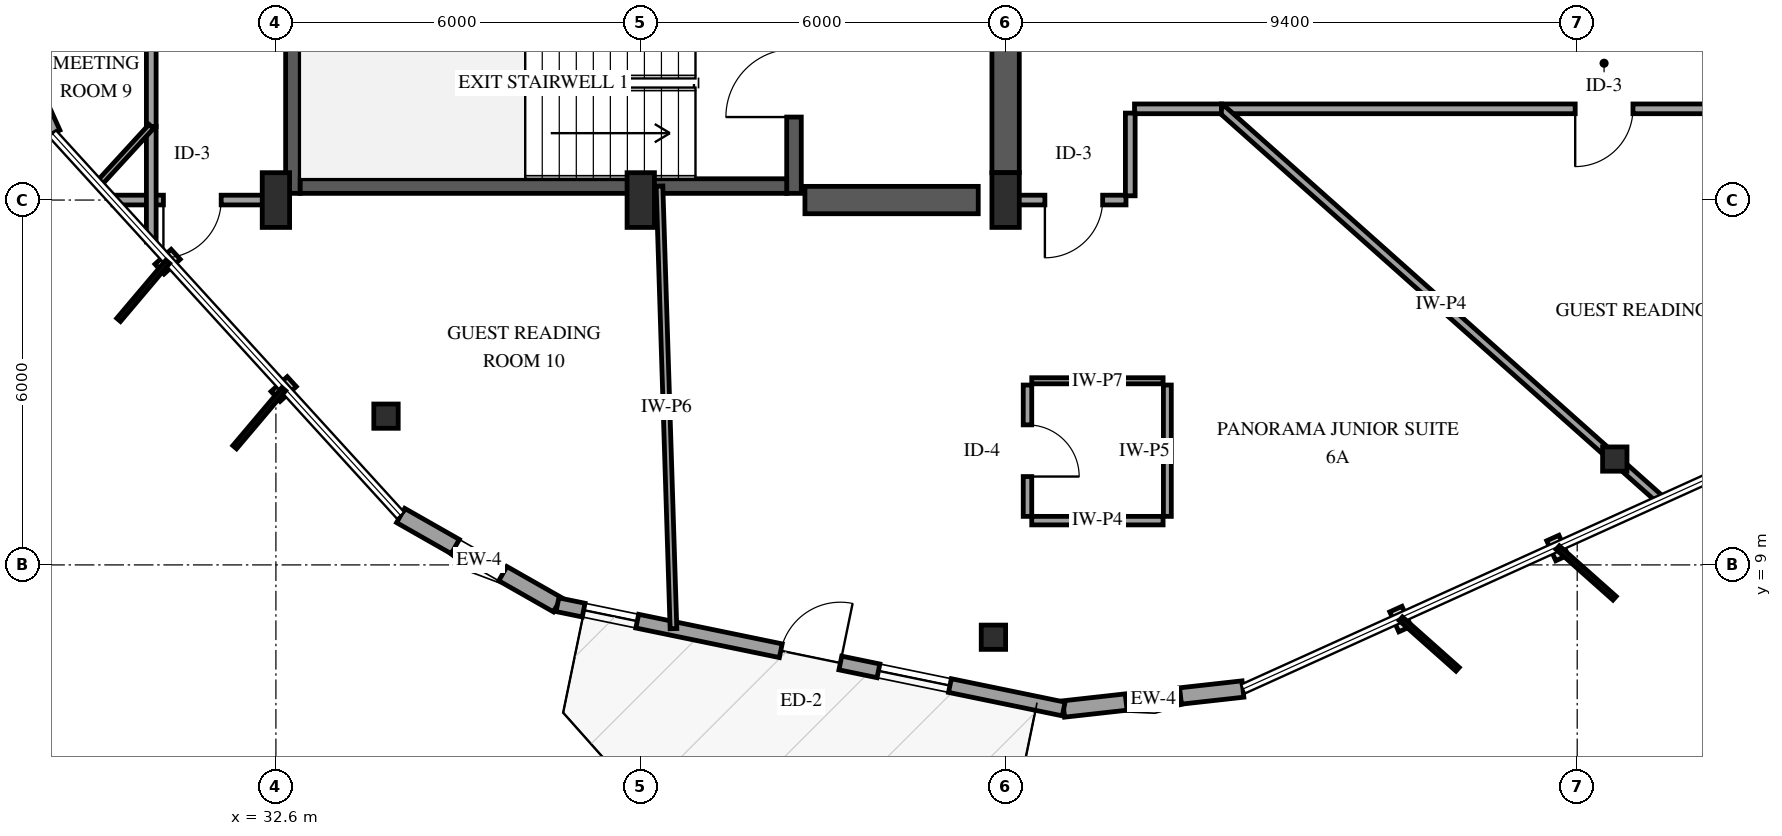
"""IFC4 building model, lengths in metres.
Left out: names, types, materials, properties, quantities, classifications, styles, units other than length and angle.
Written with IfcOpenShell. Run it as: python <this file> out.ifc"""

import sys

from ifc_helpers import new_model, si_unit, direction, frame, frame_2d, origin, origin_2d, place, context, subcontext, project, spatial, rectangle, i_section, extrude, element, fill, save


model = new_model("IFC4")
c1 = context("Model", 3, precision=1e-05, world=origin(), true_north=direction((0.0, 1.0)))
c2 = subcontext(c1, "Body", "Model", "MODEL_VIEW")
j1 = project(units=[si_unit("LENGTHUNIT", "METRE"), si_unit("PLANEANGLEUNIT", "RADIAN")], contexts=[c1])
p1 = place(None, origin())
s1 = spatial("IfcSite", under=j1, at=p1, CompositionType="ELEMENT")
p2 = place(p1, origin())
s2 = spatial("IfcBuilding", under=s1, at=p2, CompositionType="ELEMENT")
p3 = place(p2, frame((0.0, 0.0, 257.5)))
s3 = spatial("IfcBuildingStorey", under=s2, at=p3, CompositionType="ELEMENT", Elevation=257.5)
p4 = place(p3, frame((32.88, 15.11, 0.0), z_axis=(0.0, 0.0, 1.0), x_axis=(0.0, 1.0, 0.0)))
e1 = element("IfcWall", 1, at=p4, inside=s3, PredefinedType="SHEAR", context=c2, shape_type="SweptSolid", body=[
    extrude(rectangle(XDim=3.63, YDim=0.24, at=frame_2d((1.815, 0.0))), origin(), (0.0, 0.0, 1.0), 3.75),
])
p5 = place(p3, frame((41.12, 15.11, 0.0), z_axis=(0.0, 0.0, 1.0), x_axis=(0.0, 1.0, 0.0)))
e2 = element("IfcWall", 2, at=p5, inside=s3, PredefinedType="SHEAR", context=c2, shape_type="SweptSolid", body=[
    extrude(rectangle(XDim=3.63, YDim=0.24, at=frame_2d((1.815, 0.0))), origin(), (0.0, 0.0, 1.0), 3.75),
])
p6 = place(p5, frame((1.255, 0.0, 0.0)))
e3 = element("IfcOpeningElement", 3, at=p6, cuts=e2, PredefinedType="OPENING", context=c2, shape_type="SweptSolid", body=[
    extrude(rectangle(XDim=1.12, YDim=2.15, at=frame_2d((0.56, 1.075))), frame((0.0, 0.13, 0.0), z_axis=(0.0, -1.0, 0.0), x_axis=(1.0, 0.0, 0.0)), (0.0, 0.0, 1.0), 0.26),
])
p7 = place(p3, frame((33.0, 15.23, 0.0), z_axis=(0.0, 0.0, 1.0), x_axis=(1.0, 0.0, 0.0)))
e4 = element("IfcWall", 4, at=p7, inside=s3, PredefinedType="SHEAR", context=c2, shape_type="SweptSolid", body=[
    extrude(rectangle(XDim=8.0, YDim=0.24, at=frame_2d((4.0, 0.0))), origin(), (0.0, 0.0, 1.0), 3.75),
])
p8 = place(p3, frame((41.3, 15.0, 0.0), z_axis=(0.0, 0.0, 1.0), x_axis=(1.0, 0.0, 0.0)))
e5 = element("IfcWall", 5, at=p8, inside=s3, PredefinedType="SHEAR", context=c2, shape_type="SweptSolid", body=[
    extrude(rectangle(XDim=2.85, YDim=0.45, at=frame_2d((1.425, 0.0))), origin(), (0.0, 0.0, 1.0), 3.75),
])
p9 = place(p3, frame((44.6, 15.45, 0.0), z_axis=(0.0, 0.0, 1.0), x_axis=(0.0, 1.0, 0.0)))
e6 = element("IfcWall", 6, at=p9, inside=s3, PredefinedType="SHEAR", context=c2, shape_type="SweptSolid", body=[
    extrude(rectangle(XDim=6.35, YDim=0.45, at=frame_2d((3.175, 0.0))), origin(), (0.0, 0.0, 1.0), 3.75),
])
for number, where, z_axis, x_axis in (
    (7, (32.6, 15.0, 0.0), (0.0, 0.0, 1.0), (1.0, 0.0, 0.0)),
    (8, (38.6, 15.0, 0.0), (0.0, 0.0, 1.0), (1.0, 0.0, 0.0)),
    (9, (44.6, 15.0, 0.0), (0.0, 0.0, 1.0), (1.0, 0.0, 0.0)),
):
    element("IfcColumn", number, at=place(p3, frame(where, z_axis=z_axis, x_axis=x_axis)), inside=s3, PredefinedType="PILASTER", context=c2, shape_type="SweptSolid", body=[
        extrude(rectangle(XDim=0.45, YDim=0.9, at=origin_2d()), origin(), (0.0, 0.0, 1.0), 3.75),
    ])
for number, where, z_axis, x_axis in (
    (10, (34.411, 11.446, 0.0), (0.0, 0.0, 1.0), (1.0, 0.0, 0.0)),
    (11, (44.4, 7.811, 0.0), (0.0, 0.0, 1.0), (1.0, 0.0, 0.0)),
    (12, (54.618, 10.74, 0.0), (0.0, 0.0, 1.0), (1.0, 0.0, 0.0)),
):
    element("IfcColumn", number, at=place(p3, frame(where, z_axis=z_axis, x_axis=x_axis)), inside=s3, PredefinedType="COLUMN", context=c2, shape_type="SweptSolid", body=[
        extrude(i_section(OverallWidth=0.401, OverallDepth=0.399, WebThickness=0.025, FlangeThickness=0.04, FilletRadius=0.038, at=origin_2d()), origin(), (0.0, 0.0, 1.0), 3.75),
    ])
p10 = place(p3, frame((27.701, 18.796, 0.0), z_axis=(0.0, 0.0, 1.0), x_axis=(0.412481781571, -0.910965850003, 0.0)))
e13 = element("IfcWall", 13, at=p10, inside=s3, PredefinedType="SOLIDWALL", context=c2, shape_type="SweptSolid", body=[
    extrude(rectangle(XDim=2.967, YDim=0.27, at=frame_2d((1.483, 0.0))), origin(), (0.0, 0.0, 1.0), 2.829),
])
p11 = place(p10, frame((1.033, 0.0, 0.75)))
e14 = element("IfcOpeningElement", 14, at=p11, cuts=e13, PredefinedType="OPENING", context=c2, shape_type="SweptSolid", body=[
    extrude(rectangle(XDim=0.9, YDim=1.5, at=frame_2d((0.45, 0.75))), frame((0.0, 0.145, 0.0), z_axis=(0.0, -1.0, 0.0), x_axis=(1.0, 0.0, 0.0)), (0.0, 0.0, 1.0), 0.29),
])
p12 = place(p3, frame((34.652, 9.812, 0.0), z_axis=(0.0, 0.0, 1.0), x_axis=(0.869122967752, -0.494596064406, 0.0)))
e15 = element("IfcWall", 15, at=p12, inside=s3, PredefinedType="SOLIDWALL", context=c2, shape_type="SweptSolid", body=[
    extrude(rectangle(XDim=2.967, YDim=0.27, at=frame_2d((1.483, 0.0))), origin(), (0.0, 0.0, 1.0), 2.829),
])
p13 = place(p12, frame((1.033, 0.0, 0.75)))
e16 = element("IfcOpeningElement", 16, at=p13, cuts=e15, PredefinedType="OPENING", context=c2, shape_type="SweptSolid", body=[
    extrude(rectangle(XDim=0.9, YDim=1.5, at=frame_2d((0.45, 0.75))), frame((0.0, 0.145, 0.0), z_axis=(0.0, -1.0, 0.0), x_axis=(1.0, 0.0, 0.0)), (0.0, 0.0, 1.0), 0.29),
])
p14 = place(p3, frame((45.555, 6.63, 0.0), z_axis=(0.0, 0.0, 1.0), x_axis=(0.993846546507, 0.110765707676, 0.0)))
e17 = element("IfcWall", 17, at=p14, inside=s3, PredefinedType="SOLIDWALL", context=c2, shape_type="SweptSolid", body=[
    extrude(rectangle(XDim=2.967, YDim=0.27, at=frame_2d((1.483, 0.0))), origin(), (0.0, 0.0, 1.0), 2.829),
])
p15 = place(p14, frame((1.033, 0.0, 0.75)))
e18 = element("IfcOpeningElement", 18, at=p15, cuts=e17, PredefinedType="OPENING", context=c2, shape_type="SweptSolid", body=[
    extrude(rectangle(XDim=0.9, YDim=1.5, at=frame_2d((0.45, 0.75))), frame((0.0, 0.145, 0.0), z_axis=(0.0, -1.0, 0.0), x_axis=(1.0, 0.0, 0.0)), (0.0, 0.0, 1.0), 0.29),
])
p16 = place(p3, frame((37.23, 8.345, 0.0), z_axis=(0.0, 0.0, 1.0), x_axis=(0.979436514716, -0.201752605043, 0.0)))
e19 = element("IfcWall", 19, at=p16, inside=s3, PredefinedType="SOLIDWALL", context=c2, shape_type="SweptSolid", body=[
    extrude(rectangle(XDim=8.5, YDim=0.23, at=frame_2d((4.25, 0.0))), origin(), (0.0, 0.0, 1.0), 2.829),
])
p17 = place(p16, frame((3.75, 0.0, 0.0)))
e20 = element("IfcOpeningElement", 20, at=p17, cuts=e19, PredefinedType="OPENING", context=c2, shape_type="SweptSolid", body=[
    extrude(rectangle(XDim=1.0, YDim=2.15, at=frame_2d((0.5, 1.075))), frame((0.0, 0.125, 0.0), z_axis=(0.0, -1.0, 0.0), x_axis=(1.0, 0.0, 0.0)), (0.0, 0.0, 1.0), 0.25),
])
p18 = place(p16, frame((0.44, 0.0, 0.72)))
e21 = element("IfcOpeningElement", 21, at=p18, cuts=e19, PredefinedType="OPENING", context=c2, shape_type="SweptSolid", body=[
    extrude(rectangle(XDim=0.9, YDim=1.5, at=frame_2d((0.45, 0.75))), frame((0.0, 0.125, 0.0), z_axis=(0.0, -1.0, 0.0), x_axis=(1.0, 0.0, 0.0)), (0.0, 0.0, 1.0), 0.25),
])
p19 = place(p16, frame((5.39, 0.0, 0.72)))
e22 = element("IfcOpeningElement", 22, at=p19, cuts=e19, PredefinedType="OPENING", context=c2, shape_type="SweptSolid", body=[
    extrude(rectangle(XDim=1.2, YDim=1.6, at=frame_2d((0.6, 0.8))), frame((0.0, 0.125, 0.0), z_axis=(0.0, -1.0, 0.0), x_axis=(1.0, 0.0, 0.0)), (0.0, 0.0, 1.0), 0.25),
])
p20 = place(p3, frame((60.735, 16.5, 0.0), z_axis=(0.0, 0.0, 1.0), x_axis=(-1.0, 0.0, 0.0)))
e23 = element("IfcWall", 23, at=p20, inside=s3, PredefinedType="PARTITIONING", context=c2, shape_type="SweptSolid", body=[
    extrude(rectangle(XDim=12.586, YDim=0.16, at=frame_2d((6.293, 0.0))), origin(), (0.0, 0.0, 1.0), 3.45),
])
p21 = place(p20, frame((5.818, 0.0, 0.0)))
e24 = element("IfcOpeningElement", 24, at=p21, cuts=e23, PredefinedType="OPENING", context=c2, shape_type="SweptSolid", body=[
    extrude(rectangle(XDim=0.95, YDim=2.15, at=frame_2d((0.475, 1.075))), frame((0.0, 0.09, 0.0), z_axis=(0.0, -1.0, 0.0), x_axis=(1.0, 0.0, 0.0)), (0.0, 0.0, 1.0), 0.18),
])
p22 = place(p3, frame((48.149, 16.5, 0.0), z_axis=(0.0, 0.0, 1.0), x_axis=(0.746878427267, -0.664960611527, 0.0)))
e25 = element("IfcWall", 25, at=p22, inside=s3, PredefinedType="PARTITIONING", context=c2, shape_type="SweptSolid", body=[
    extrude(rectangle(XDim=9.671, YDim=0.14, at=frame_2d((4.835, 0.0))), origin(), (0.0, 0.0, 1.0), 2.828),
])
p23 = place(p3, frame((38.908, 15.23, 0.0), z_axis=(0.0, 0.0, 1.0), x_axis=(0.03158331011, -0.999501122822, 0.0)))
e26 = element("IfcWall", 26, at=p23, inside=s3, PredefinedType="PARTITIONING", context=c2, shape_type="SweptSolid", body=[
    extrude(rectangle(XDim=7.282, YDim=0.11, at=frame_2d((3.641, 0.0))), origin(), (0.0, 0.0, 1.0), 3.45),
])
p24 = place(p3, frame((30.55, 16.21, 0.0), z_axis=(0.0, 0.0, 1.0), x_axis=(0.0, 1.0, 0.0)))
e27 = element("IfcWall", 27, at=p24, inside=s3, PredefinedType="PARTITIONING", context=c2, shape_type="SweptSolid", body=[
    extrude(rectangle(XDim=5.024, YDim=0.16, at=frame_2d((2.512, 0.0))), origin(), (0.0, 0.0, 1.0), 3.45),
])
p25 = place(p24, frame((2.037, 0.0, 0.0)))
e28 = element("IfcOpeningElement", 28, at=p25, cuts=e27, PredefinedType="OPENING", context=c2, shape_type="SweptSolid", body=[
    extrude(rectangle(XDim=0.95, YDim=2.15, at=frame_2d((0.475, 1.075))), frame((0.0, 0.09, 0.0), z_axis=(0.0, -1.0, 0.0), x_axis=(1.0, 0.0, 0.0)), (0.0, 0.0, 1.0), 0.18),
])
p26 = place(p3, frame((32.53, 15.0, 0.0), z_axis=(0.0, 0.0, 1.0), x_axis=(-1.0, 0.0, 0.0)))
e29 = element("IfcWall", 29, at=p26, inside=s3, PredefinedType="PARTITIONING", context=c2, shape_type="SweptSolid", body=[
    extrude(rectangle(XDim=2.609, YDim=0.16, at=frame_2d((1.305, 0.0))), origin(), (0.0, 0.0, 1.0), 3.45),
])
p27 = place(p26, frame((0.83, 0.0, 0.0)))
e30 = element("IfcOpeningElement", 30, at=p27, cuts=e29, PredefinedType="OPENING", context=c2, shape_type="SweptSolid", body=[
    extrude(rectangle(XDim=0.95, YDim=2.15, at=frame_2d((0.475, 1.075))), frame((0.0, 0.09, 0.0), z_axis=(0.0, -1.0, 0.0), x_axis=(1.0, 0.0, 0.0)), (0.0, 0.0, 1.0), 0.18),
])
p28 = place(p3, frame((44.96, 11.958, 0.0), z_axis=(0.0, 0.0, 1.0), x_axis=(0.0, -1.0, 0.0)))
e31 = element("IfcWall", 31, at=p28, inside=s3, PredefinedType="PARTITIONING", context=c2, shape_type="SweptSolid", body=[
    extrude(rectangle(XDim=2.16, YDim=0.14, at=frame_2d((1.08, 0.0))), origin(), (0.0, 0.0, 1.0), 2.828),
])
p29 = place(p28, frame((0.655, 0.0, 0.0)))
e32 = element("IfcOpeningElement", 32, at=p29, cuts=e31, PredefinedType="OPENING", context=c2, shape_type="SweptSolid", body=[
    extrude(rectangle(XDim=0.85, YDim=2.1, at=frame_2d((0.425, 1.05))), frame((0.0, 0.08, 0.0), z_axis=(0.0, -1.0, 0.0), x_axis=(1.0, 0.0, 0.0)), (0.0, 0.0, 1.0), 0.16),
])
p30 = place(p3, frame((47.26, 9.798, 0.0), z_axis=(0.0, 0.0, 1.0), x_axis=(0.0, 1.0, 0.0)))
e33 = element("IfcWall", 33, at=p30, inside=s3, PredefinedType="PARTITIONING", context=c2, shape_type="SweptSolid", body=[
    extrude(rectangle(XDim=2.16, YDim=0.13, at=frame_2d((1.08, 0.0))), origin(), (0.0, 0.0, 1.0), 3.45),
])
p31 = place(p3, frame((47.19, 12.028, 0.0), z_axis=(0.0, 0.0, 1.0), x_axis=(-1.0, 0.0, 0.0)))
e34 = element("IfcWall", 34, at=p31, inside=s3, PredefinedType="PARTITIONING", context=c2, shape_type="SweptSolid", body=[
    extrude(rectangle(XDim=2.16, YDim=0.1, at=frame_2d((1.08, 0.0))), origin(), (0.0, 0.0, 1.0), 3.45),
])
p32 = place(p3, frame((45.03, 9.728, 0.0), z_axis=(0.0, 0.0, 1.0), x_axis=(1.0, 0.0, 0.0)))
e35 = element("IfcWall", 35, at=p32, inside=s3, PredefinedType="PARTITIONING", context=c2, shape_type="SweptSolid", body=[
    extrude(rectangle(XDim=2.16, YDim=0.14, at=frame_2d((1.08, 0.0))), origin(), (0.0, 0.0, 1.0), 3.45),
])
p33 = place(p3, frame((46.58, 15.0, 0.0), z_axis=(0.0, 0.0, 1.0), x_axis=(-1.0, 0.0, 0.0)))
e36 = element("IfcWall", 36, at=p33, inside=s3, PredefinedType="PARTITIONING", context=c2, shape_type="SweptSolid", body=[
    extrude(rectangle(XDim=1.91, YDim=0.16, at=frame_2d((0.955, 0.0))), origin(), (0.0, 0.0, 1.0), 3.45),
])
p34 = place(p33, frame((0.384, 0.0, 0.0)))
e37 = element("IfcOpeningElement", 37, at=p34, cuts=e36, PredefinedType="OPENING", context=c2, shape_type="SweptSolid", body=[
    extrude(rectangle(XDim=0.95, YDim=2.15, at=frame_2d((0.475, 1.075))), frame((0.0, 0.09, 0.0), z_axis=(0.0, -1.0, 0.0), x_axis=(1.0, 0.0, 0.0)), (0.0, 0.0, 1.0), 0.18),
])
p35 = place(p3, frame((30.55, 14.311, 0.0), z_axis=(0.0, 0.0, 1.0), x_axis=(0.0, 1.0, 0.0)))
e38 = element("IfcWall", 38, at=p35, inside=s3, PredefinedType="PARTITIONING", context=c2, shape_type="SweptSolid", body=[
    extrude(rectangle(XDim=1.899, YDim=0.16, at=frame_2d((0.949, 0.0))), origin(), (0.0, 0.0, 1.0), 3.45),
])
p36 = place(p3, frame((48.149, 16.5, 0.0), z_axis=(0.0, 0.0, 1.0), x_axis=(-1.0, 0.0, 0.0)))
e39 = element("IfcWall", 39, at=p36, inside=s3, PredefinedType="PARTITIONING", context=c2, shape_type="SweptSolid", body=[
    extrude(rectangle(XDim=1.429, YDim=0.16, at=frame_2d((0.714, 0.0))), origin(), (0.0, 0.0, 1.0), 3.45),
])
p37 = place(p3, frame((46.65, 16.43, 0.0), z_axis=(0.0, 0.0, 1.0), x_axis=(0.0, -1.0, 0.0)))
e40 = element("IfcWall", 40, at=p37, inside=s3, PredefinedType="PARTITIONING", context=c2, shape_type="SweptSolid", body=[
    extrude(rectangle(XDim=1.36, YDim=0.16, at=frame_2d((0.68, 0.0))), origin(), (0.0, 0.0, 1.0), 3.45),
])
p38 = place(p3, frame((30.55, 16.21, 0.0), z_axis=(0.0, 0.0, 1.0), x_axis=(-0.675750443643, -0.737130475504, 0.0)))
e41 = element("IfcWall", 41, at=p38, inside=s3, PredefinedType="PARTITIONING", context=c2, shape_type="SweptSolid", body=[
    extrude(rectangle(XDim=1.285, YDim=0.1, at=frame_2d((0.642, 0.0))), origin(), (0.0, 0.0, 1.0), 3.45),
])
p39 = place(p13, origin())
e42 = element("IfcWindow", 42, at=p39, inside=s3, PartitioningType="SINGLE_PANEL", PredefinedType="WINDOW", context=c2, shape_type="SweptSolid", body=[
    extrude(rectangle(XDim=0.9, YDim=1.5, at=frame_2d((0.45, 0.75))), frame((0.0, 0.03, 0.0), z_axis=(0.0, -1.0, 0.0), x_axis=(1.0, 0.0, 0.0)), (0.0, 0.0, 1.0), 0.06),
])
fill(e16, e42)
p40 = place(p15, origin())
e43 = element("IfcWindow", 43, at=p40, inside=s3, PartitioningType="SINGLE_PANEL", PredefinedType="WINDOW", context=c2, shape_type="SweptSolid", body=[
    extrude(rectangle(XDim=0.9, YDim=1.5, at=frame_2d((0.45, 0.75))), frame((0.0, 0.03, 0.0), z_axis=(0.0, -1.0, 0.0), x_axis=(1.0, 0.0, 0.0)), (0.0, 0.0, 1.0), 0.06),
])
fill(e18, e43)
p41 = place(p17, origin())
e44 = element("IfcDoor", 44, at=p41, inside=s3, OperationType="SINGLE_SWING_RIGHT", PredefinedType="DOOR", context=c2, shape_type="SweptSolid", body=[
    extrude(rectangle(XDim=1.0, YDim=2.15, at=frame_2d((0.5, 1.075))), frame((0.0, 0.025, 0.0), z_axis=(0.0, -1.0, 0.0), x_axis=(1.0, 0.0, 0.0)), (0.0, 0.0, 1.0), 0.05),
])
fill(e20, e44)
p42 = place(p18, origin())
e45 = element("IfcWindow", 45, at=p42, inside=s3, PartitioningType="SINGLE_PANEL", PredefinedType="WINDOW", context=c2, shape_type="SweptSolid", body=[
    extrude(rectangle(XDim=0.9, YDim=1.5, at=frame_2d((0.45, 0.75))), frame((0.0, 0.03, 0.0), z_axis=(0.0, -1.0, 0.0), x_axis=(1.0, 0.0, 0.0)), (0.0, 0.0, 1.0), 0.06),
])
fill(e21, e45)
p43 = place(p19, origin())
e46 = element("IfcWindow", 46, at=p43, inside=s3, PartitioningType="SINGLE_PANEL", PredefinedType="WINDOW", context=c2, shape_type="SweptSolid", body=[
    extrude(rectangle(XDim=1.2, YDim=1.6, at=frame_2d((0.6, 0.8))), frame((0.0, 0.03, 0.0), z_axis=(0.0, -1.0, 0.0), x_axis=(1.0, 0.0, 0.0)), (0.0, 0.0, 1.0), 0.06),
])
fill(e22, e46)
p44 = place(p6, origin())
e47 = element("IfcDoor", 47, at=p44, inside=s3, OperationType="SINGLE_SWING_LEFT", PredefinedType="DOOR", context=c2, shape_type="SweptSolid", body=[
    extrude(rectangle(XDim=1.12, YDim=2.15, at=frame_2d((0.56, 1.075))), frame((0.0, 0.025, 0.0), z_axis=(0.0, -1.0, 0.0), x_axis=(1.0, 0.0, 0.0)), (0.0, 0.0, 1.0), 0.05),
])
fill(e3, e47)
p45 = place(p21, origin())
e48 = element("IfcDoor", 48, at=p45, inside=s3, OperationType="SINGLE_SWING_RIGHT", PredefinedType="DOOR", context=c2, shape_type="SweptSolid", body=[
    extrude(rectangle(XDim=0.95, YDim=2.15, at=frame_2d((0.475, 1.075))), frame((0.0, 0.025, 0.0), z_axis=(0.0, -1.0, 0.0), x_axis=(1.0, 0.0, 0.0)), (0.0, 0.0, 1.0), 0.05),
])
fill(e24, e48)
p46 = place(p27, origin())
e49 = element("IfcDoor", 49, at=p46, inside=s3, OperationType="SINGLE_SWING_RIGHT", PredefinedType="DOOR", context=c2, shape_type="SweptSolid", body=[
    extrude(rectangle(XDim=0.95, YDim=2.15, at=frame_2d((0.475, 1.075))), frame((0.0, 0.025, 0.0), z_axis=(0.0, -1.0, 0.0), x_axis=(1.0, 0.0, 0.0)), (0.0, 0.0, 1.0), 0.05),
])
fill(e30, e49)
p47 = place(p29, origin())
e50 = element("IfcDoor", 50, at=p47, inside=s3, OperationType="SINGLE_SWING_RIGHT", PredefinedType="DOOR", context=c2, shape_type="SweptSolid", body=[
    extrude(rectangle(XDim=0.85, YDim=2.1, at=frame_2d((0.425, 1.05))), frame((0.0, 0.025, 0.0), z_axis=(0.0, -1.0, 0.0), x_axis=(1.0, 0.0, 0.0)), (0.0, 0.0, 1.0), 0.05),
])
fill(e32, e50)
p48 = place(p34, origin())
e51 = element("IfcDoor", 51, at=p48, inside=s3, OperationType="SINGLE_SWING_RIGHT", PredefinedType="DOOR", context=c2, shape_type="SweptSolid", body=[
    extrude(rectangle(XDim=0.95, YDim=2.15, at=frame_2d((0.475, 1.075))), frame((0.0, 0.025, 0.0), z_axis=(0.0, -1.0, 0.0), x_axis=(1.0, 0.0, 0.0)), (0.0, 0.0, 1.0), 0.05),
])
fill(e37, e51)
save(model, sys.argv[1])
